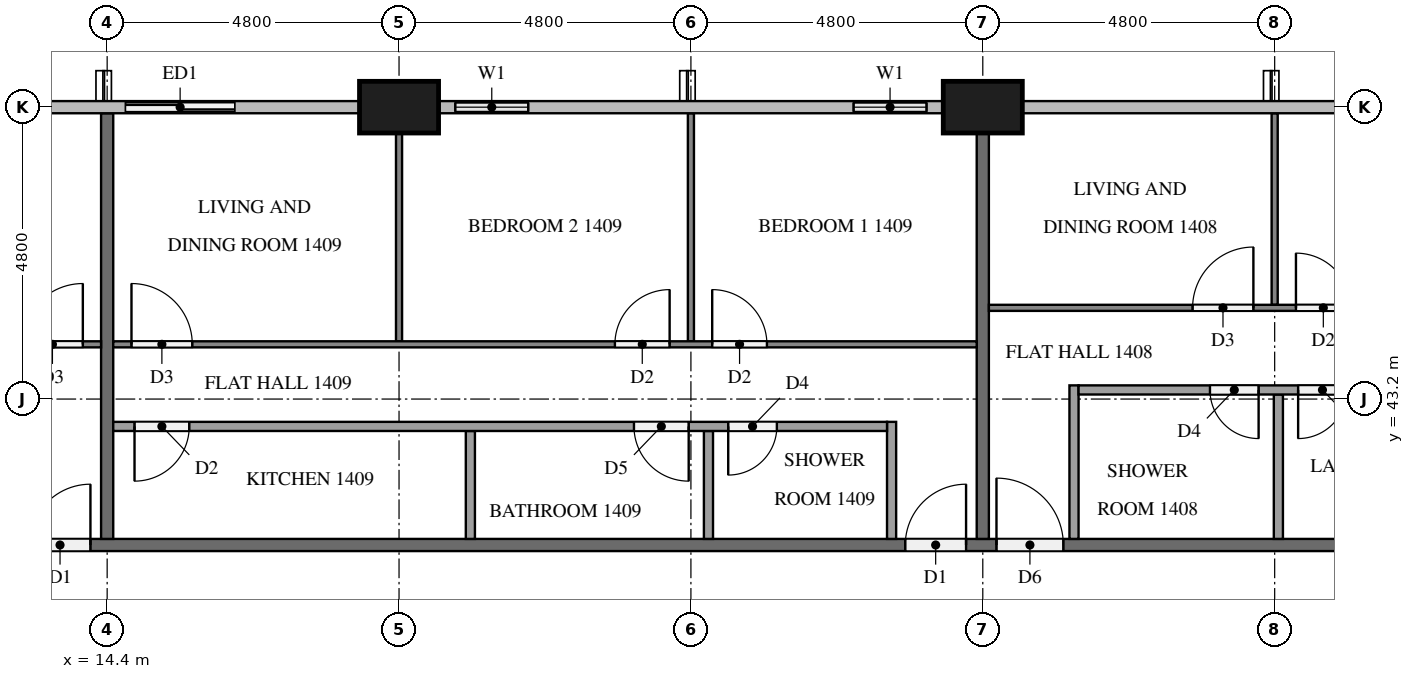
"""IFC4 building model, lengths in metres.
Left out: names, types, materials, properties, quantities, classifications, styles, units other than length and angle.
Written with IfcOpenShell. Run it as: python <this file> out.ifc"""

import sys

from ifc_helpers import new_model, si_unit, direction, frame, frame_2d, origin, origin_2d, place, context, subcontext, project, spatial, rectangle, extrude, element, fill, save


model = new_model("IFC4")
c1 = context("Model", 3, precision=1e-05, world=origin(), true_north=direction((0.0, 1.0)))
c2 = subcontext(c1, "Body", "Model", "MODEL_VIEW")
j1 = project(units=[si_unit("LENGTHUNIT", "METRE"), si_unit("PLANEANGLEUNIT", "RADIAN")], contexts=[c1])
p1 = place(None, origin())
s1 = spatial("IfcSite", under=j1, at=p1, CompositionType="ELEMENT")
p2 = place(p1, origin())
s2 = spatial("IfcBuilding", under=s1, at=p2, CompositionType="ELEMENT")
p3 = place(p2, frame((0.0, 0.0, 59.3)))
s3 = spatial("IfcBuildingStorey", under=s2, at=p3, CompositionType="ELEMENT", Elevation=59.3)
for number, where, z_axis, x_axis in (
    (1, (28.8, 48.0, 0.0), (0.0, 0.0, 1.0), (1.0, 0.0, 0.0)),
    (2, (19.2, 48.0, 0.0), (0.0, 0.0, 1.0), (1.0, 0.0, 0.0)),
):
    element("IfcColumn", number, at=place(p3, frame(where, z_axis=z_axis, x_axis=x_axis)), inside=s3, PredefinedType="COLUMN", context=c2, shape_type="SweptSolid", body=[
        extrude(rectangle(XDim=1.3, YDim=0.85, at=origin_2d()), origin(), (0.0, 0.0, 1.0), 3.2),
    ])
p4 = place(p3, frame((28.15, 48.0, 0.0), z_axis=(0.0, 0.0, 1.0), x_axis=(-1.0, 0.0, 0.0)))
e3 = element("IfcWall", 3, at=p4, inside=s3, PredefinedType="SOLIDWALL", context=c2, shape_type="SweptSolid", body=[
    extrude(rectangle(XDim=1.75, YDim=0.15, at=frame_2d((0.875, 0.0))), origin(), (0.0, 0.0, 1.0), 3.2),
])
p5 = place(p4, frame((0.275, 0.0, 0.9)))
e4 = element("IfcOpeningElement", 4, at=p5, cuts=e3, PredefinedType="OPENING", context=c2, shape_type="SweptSolid", body=[
    extrude(rectangle(XDim=1.2, YDim=1.4, at=frame_2d((0.6, 0.7))), frame((0.0, 0.085, 0.0), z_axis=(0.0, -1.0, 0.0), x_axis=(1.0, 0.0, 0.0)), (0.0, 0.0, 1.0), 0.17),
])
p6 = place(p3, frame((21.6, 48.0, 0.0), z_axis=(0.0, 0.0, 1.0), x_axis=(-1.0, 0.0, 0.0)))
e5 = element("IfcWall", 5, at=p6, inside=s3, PredefinedType="SOLIDWALL", context=c2, shape_type="SweptSolid", body=[
    extrude(rectangle(XDim=1.75, YDim=0.15, at=frame_2d((0.875, 0.0))), origin(), (0.0, 0.0, 1.0), 3.2),
])
p7 = place(p6, frame((0.275, 0.0, 0.9)))
e6 = element("IfcOpeningElement", 6, at=p7, cuts=e5, PredefinedType="OPENING", context=c2, shape_type="SweptSolid", body=[
    extrude(rectangle(XDim=1.2, YDim=1.4, at=frame_2d((0.6, 0.7))), frame((0.0, 0.085, 0.0), z_axis=(0.0, -1.0, 0.0), x_axis=(1.0, 0.0, 0.0)), (0.0, 0.0, 1.0), 0.17),
])
p8 = place(p3, frame((16.8, 48.0, 0.0), z_axis=(0.0, 0.0, 1.0), x_axis=(-1.0, 0.0, 0.0)))
e7 = element("IfcWall", 7, at=p8, inside=s3, PredefinedType="SOLIDWALL", context=c2, shape_type="SweptSolid", body=[
    extrude(rectangle(XDim=2.4, YDim=0.15, at=frame_2d((1.2, 0.0))), origin(), (0.0, 0.0, 1.0), 3.2),
])
p9 = place(p8, frame((0.3, 0.0, 0.0)))
e8 = element("IfcOpeningElement", 8, at=p9, cuts=e7, PredefinedType="OPENING", context=c2, shape_type="SweptSolid", body=[
    extrude(rectangle(XDim=1.8, YDim=2.4, at=frame_2d((0.9, 1.2))), frame((0.0, 0.085, 0.0), z_axis=(0.0, -1.0, 0.0), x_axis=(1.0, 0.0, 0.0)), (0.0, 0.0, 1.0), 0.17),
])
p10 = place(p3, frame((11.9, 40.8, 0.0), z_axis=(0.0, 0.0, 1.0), x_axis=(1.0, 0.0, 0.0)))
e9 = element("IfcWall", 9, at=p10, inside=s3, PredefinedType="PARTITIONING", context=c2, shape_type="SweptSolid", body=[
    extrude(rectangle(XDim=38.6, YDim=0.2, at=frame_2d((19.3, 0.0))), origin(), (0.0, 0.0, 1.0), 3.2),
])
p11 = place(p10, frame((36.375, 0.0, 0.0)))
e10 = element("IfcOpeningElement", 10, at=p11, cuts=e9, PredefinedType="OPENING", context=c2, shape_type="SweptSolid", body=[
    extrude(rectangle(XDim=1.0, YDim=2.1, at=frame_2d((0.5, 1.05))), frame((0.0, 0.11, 0.0), z_axis=(0.0, -1.0, 0.0), x_axis=(1.0, 0.0, 0.0)), (0.0, 0.0, 1.0), 0.22),
])
p12 = place(p10, frame((17.125, 0.0, 0.0)))
e11 = element("IfcOpeningElement", 11, at=p12, cuts=e9, PredefinedType="OPENING", context=c2, shape_type="SweptSolid", body=[
    extrude(rectangle(XDim=1.1, YDim=2.1, at=frame_2d((0.55, 1.05))), frame((0.0, 0.11, 0.0), z_axis=(0.0, -1.0, 0.0), x_axis=(1.0, 0.0, 0.0)), (0.0, 0.0, 1.0), 0.22),
])
p13 = place(p10, frame((15.625, 0.0, 0.0)))
e12 = element("IfcOpeningElement", 12, at=p13, cuts=e9, PredefinedType="OPENING", context=c2, shape_type="SweptSolid", body=[
    extrude(rectangle(XDim=1.0, YDim=2.1, at=frame_2d((0.5, 1.05))), frame((0.0, 0.11, 0.0), z_axis=(0.0, -1.0, 0.0), x_axis=(1.0, 0.0, 0.0)), (0.0, 0.0, 1.0), 0.22),
])
p14 = place(p10, frame((1.225, 0.0, 0.0)))
e13 = element("IfcOpeningElement", 13, at=p14, cuts=e9, PredefinedType="OPENING", context=c2, shape_type="SweptSolid", body=[
    extrude(rectangle(XDim=1.0, YDim=2.1, at=frame_2d((0.5, 1.05))), frame((0.0, 0.11, 0.0), z_axis=(0.0, -1.0, 0.0), x_axis=(1.0, 0.0, 0.0)), (0.0, 0.0, 1.0), 0.22),
])
p15 = place(p3, frame((28.8, 47.575, 0.0), z_axis=(0.0, 0.0, 1.0), x_axis=(0.0, -1.0, 0.0)))
e14 = element("IfcWall", 14, at=p15, inside=s3, PredefinedType="PARTITIONING", context=c2, shape_type="SweptSolid", body=[
    extrude(rectangle(XDim=6.675, YDim=0.2, at=frame_2d((3.337, 0.0))), origin(), (0.0, 0.0, 1.0), 3.2),
])
p16 = place(p3, frame((14.4, 47.9, 0.0), z_axis=(0.0, 0.0, 1.0), x_axis=(0.0, -1.0, 0.0)))
e15 = element("IfcWall", 15, at=p16, inside=s3, PredefinedType="PARTITIONING", context=c2, shape_type="SweptSolid", body=[
    extrude(rectangle(XDim=7.0, YDim=0.2, at=frame_2d((3.5, 0.0))), origin(), (0.0, 0.0, 1.0), 3.2),
])
p17 = place(p3, frame((33.6, 44.75, 0.0), z_axis=(0.0, 0.0, 1.0), x_axis=(0.0, 1.0, 0.0)))
e16 = element("IfcWall", 16, at=p17, inside=s3, PredefinedType="PARTITIONING", context=c2, shape_type="SweptSolid", body=[
    extrude(rectangle(XDim=3.15, YDim=0.1, at=frame_2d((1.575, 0.0))), origin(), (0.0, 0.0, 1.0), 3.2),
])
p18 = place(p3, frame((28.9, 44.7, 0.0), z_axis=(0.0, 0.0, 1.0), x_axis=(1.0, 0.0, 0.0)))
e17 = element("IfcWall", 17, at=p18, inside=s3, PredefinedType="PARTITIONING", context=c2, shape_type="SweptSolid", body=[
    extrude(rectangle(XDim=19.0, YDim=0.1, at=frame_2d((9.5, 0.0))), origin(), (0.0, 0.0, 1.0), 3.2),
])
p19 = place(p18, frame((3.35, 0.0, 0.0)))
e18 = element("IfcOpeningElement", 18, at=p19, cuts=e17, PredefinedType="OPENING", context=c2, shape_type="SweptSolid", body=[
    extrude(rectangle(XDim=1.0, YDim=2.1, at=frame_2d((0.5, 1.05))), frame((0.0, 0.06, 0.0), z_axis=(0.0, -1.0, 0.0), x_axis=(1.0, 0.0, 0.0)), (0.0, 0.0, 1.0), 0.12),
])
p20 = place(p18, frame((5.05, 0.0, 0.0)))
e19 = element("IfcOpeningElement", 19, at=p20, cuts=e17, PredefinedType="OPENING", context=c2, shape_type="SweptSolid", body=[
    extrude(rectangle(XDim=0.9, YDim=2.1, at=frame_2d((0.45, 1.05))), frame((0.0, 0.06, 0.0), z_axis=(0.0, -1.0, 0.0), x_axis=(1.0, 0.0, 0.0)), (0.0, 0.0, 1.0), 0.12),
])
p21 = place(p18, frame((13.05, 0.0, 0.0)))
e20 = element("IfcOpeningElement", 20, at=p21, cuts=e17, PredefinedType="OPENING", context=c2, shape_type="SweptSolid", body=[
    extrude(rectangle(XDim=0.9, YDim=2.1, at=frame_2d((0.45, 1.05))), frame((0.0, 0.06, 0.0), z_axis=(0.0, -1.0, 0.0), x_axis=(1.0, 0.0, 0.0)), (0.0, 0.0, 1.0), 0.12),
])
p22 = place(p18, frame((14.65, 0.0, 0.0)))
e21 = element("IfcOpeningElement", 21, at=p22, cuts=e17, PredefinedType="OPENING", context=c2, shape_type="SweptSolid", body=[
    extrude(rectangle(XDim=0.9, YDim=2.1, at=frame_2d((0.45, 1.05))), frame((0.0, 0.06, 0.0), z_axis=(0.0, -1.0, 0.0), x_axis=(1.0, 0.0, 0.0)), (0.0, 0.0, 1.0), 0.12),
])
p23 = place(p3, frame((33.661, 40.9, 0.0), z_axis=(0.0, 0.0, 1.0), x_axis=(0.0, 1.0, 0.0)))
e22 = element("IfcWall", 22, at=p23, inside=s3, PredefinedType="PARTITIONING", context=c2, shape_type="SweptSolid", body=[
    extrude(rectangle(XDim=2.375, YDim=0.15, at=frame_2d((1.188, 0.0))), origin(), (0.0, 0.0, 1.0), 3.2),
])
p24 = place(p3, frame((30.3, 40.9, 0.0), z_axis=(0.0, 0.0, 1.0), x_axis=(0.0, 1.0, 0.0)))
e23 = element("IfcWall", 23, at=p24, inside=s3, PredefinedType="PARTITIONING", context=c2, shape_type="SweptSolid", body=[
    extrude(rectangle(XDim=2.525, YDim=0.15, at=frame_2d((1.263, 0.0))), origin(), (0.0, 0.0, 1.0), 3.2),
])
p25 = place(p3, frame((47.9, 43.35, 0.0), z_axis=(0.0, 0.0, 1.0), x_axis=(-1.0, 0.0, 0.0)))
e24 = element("IfcWall", 24, at=p25, inside=s3, PredefinedType="PARTITIONING", context=c2, shape_type="SweptSolid", body=[
    extrude(rectangle(XDim=17.525, YDim=0.15, at=frame_2d((8.762, 0.0))), origin(), (0.0, 0.0, 1.0), 3.2),
])
p26 = place(p25, frame((14.564, 0.0, 0.0)))
e25 = element("IfcOpeningElement", 25, at=p26, cuts=e24, PredefinedType="OPENING", context=c2, shape_type="SweptSolid", body=[
    extrude(rectangle(XDim=0.8, YDim=2.1, at=frame_2d((0.4, 1.05))), frame((0.0, 0.085, 0.0), z_axis=(0.0, -1.0, 0.0), x_axis=(1.0, 0.0, 0.0)), (0.0, 0.0, 1.0), 0.17),
])
p27 = place(p25, frame((13.114, 0.0, 0.0)))
e26 = element("IfcOpeningElement", 26, at=p27, cuts=e24, PredefinedType="OPENING", context=c2, shape_type="SweptSolid", body=[
    extrude(rectangle(XDim=0.8, YDim=2.1, at=frame_2d((0.4, 1.05))), frame((0.0, 0.085, 0.0), z_axis=(0.0, -1.0, 0.0), x_axis=(1.0, 0.0, 0.0)), (0.0, 0.0, 1.0), 0.17),
])
p28 = place(p25, frame((4.706, 0.0, 0.0)))
e27 = element("IfcOpeningElement", 27, at=p28, cuts=e24, PredefinedType="OPENING", context=c2, shape_type="SweptSolid", body=[
    extrude(rectangle(XDim=0.9, YDim=2.1, at=frame_2d((0.45, 1.05))), frame((0.0, 0.085, 0.0), z_axis=(0.0, -1.0, 0.0), x_axis=(1.0, 0.0, 0.0)), (0.0, 0.0, 1.0), 0.17),
])
p29 = place(p25, frame((3.156, 0.0, 0.0)))
e28 = element("IfcOpeningElement", 28, at=p29, cuts=e24, PredefinedType="OPENING", context=c2, shape_type="SweptSolid", body=[
    extrude(rectangle(XDim=0.9, YDim=2.1, at=frame_2d((0.45, 1.05))), frame((0.0, 0.085, 0.0), z_axis=(0.0, -1.0, 0.0), x_axis=(1.0, 0.0, 0.0)), (0.0, 0.0, 1.0), 0.17),
])
p30 = place(p3, frame((24.0, 44.15, 0.0), z_axis=(0.0, 0.0, 1.0), x_axis=(0.0, 1.0, 0.0)))
e29 = element("IfcWall", 29, at=p30, inside=s3, PredefinedType="PARTITIONING", context=c2, shape_type="SweptSolid", body=[
    extrude(rectangle(XDim=3.75, YDim=0.1, at=frame_2d((1.875, 0.0))), origin(), (0.0, 0.0, 1.0), 3.2),
])
p31 = place(p3, frame((19.2, 44.15, 0.0), z_axis=(0.0, 0.0, 1.0), x_axis=(0.0, 1.0, 0.0)))
e30 = element("IfcWall", 30, at=p31, inside=s3, PredefinedType="PARTITIONING", context=c2, shape_type="SweptSolid", body=[
    extrude(rectangle(XDim=3.425, YDim=0.1, at=frame_2d((1.712, 0.0))), origin(), (0.0, 0.0, 1.0), 3.2),
])
p32 = place(p3, frame((14.5, 44.1, 0.0), z_axis=(0.0, 0.0, 1.0), x_axis=(1.0, 0.0, 0.0)))
e31 = element("IfcWall", 31, at=p32, inside=s3, PredefinedType="PARTITIONING", context=c2, shape_type="SweptSolid", body=[
    extrude(rectangle(XDim=14.2, YDim=0.1, at=frame_2d((7.1, 0.0))), origin(), (0.0, 0.0, 1.0), 3.2),
])
p33 = place(p32, frame((9.85, 0.0, 0.0)))
e32 = element("IfcOpeningElement", 32, at=p33, cuts=e31, PredefinedType="OPENING", context=c2, shape_type="SweptSolid", body=[
    extrude(rectangle(XDim=0.9, YDim=2.1, at=frame_2d((0.45, 1.05))), frame((0.0, 0.06, 0.0), z_axis=(0.0, -1.0, 0.0), x_axis=(1.0, 0.0, 0.0)), (0.0, 0.0, 1.0), 0.12),
])
p34 = place(p32, frame((8.25, 0.0, 0.0)))
e33 = element("IfcOpeningElement", 33, at=p34, cuts=e31, PredefinedType="OPENING", context=c2, shape_type="SweptSolid", body=[
    extrude(rectangle(XDim=0.9, YDim=2.1, at=frame_2d((0.45, 1.05))), frame((0.0, 0.06, 0.0), z_axis=(0.0, -1.0, 0.0), x_axis=(1.0, 0.0, 0.0)), (0.0, 0.0, 1.0), 0.12),
])
p35 = place(p32, frame((0.3, 0.0, 0.0)))
e34 = element("IfcOpeningElement", 34, at=p35, cuts=e31, PredefinedType="OPENING", context=c2, shape_type="SweptSolid", body=[
    extrude(rectangle(XDim=1.0, YDim=2.1, at=frame_2d((0.5, 1.05))), frame((0.0, 0.06, 0.0), z_axis=(0.0, -1.0, 0.0), x_axis=(1.0, 0.0, 0.0)), (0.0, 0.0, 1.0), 0.12),
])
for number, where, z_axis, x_axis in (
    (35, (24.289, 40.9, 0.0), (0.0, 0.0, 1.0), (0.0, 1.0, 0.0)),
    (36, (20.373, 40.9, 0.0), (0.0, 0.0, 1.0), (0.0, 1.0, 0.0)),
):
    element("IfcWall", number, at=place(p3, frame(where, z_axis=z_axis, x_axis=x_axis)), inside=s3, PredefinedType="PARTITIONING", context=c2, shape_type="SweptSolid", body=[
        extrude(rectangle(XDim=1.775, YDim=0.15, at=frame_2d((0.888, 0.0))), origin(), (0.0, 0.0, 1.0), 3.2),
    ])
p36 = place(p3, frame((27.3, 40.9, 0.0), z_axis=(0.0, 0.0, 1.0), x_axis=(0.0, 1.0, 0.0)))
e37 = element("IfcWall", 37, at=p36, inside=s3, PredefinedType="PARTITIONING", context=c2, shape_type="SweptSolid", body=[
    extrude(rectangle(XDim=1.925, YDim=0.15, at=frame_2d((0.962, 0.0))), origin(), (0.0, 0.0, 1.0), 3.2),
])
p37 = place(p3, frame((27.225, 42.75, 0.0), z_axis=(0.0, 0.0, 1.0), x_axis=(-1.0, 0.0, 0.0)))
e38 = element("IfcWall", 38, at=p37, inside=s3, PredefinedType="PARTITIONING", context=c2, shape_type="SweptSolid", body=[
    extrude(rectangle(XDim=12.725, YDim=0.15, at=frame_2d((6.363, 0.0))), origin(), (0.0, 0.0, 1.0), 3.2),
])
p38 = place(p37, frame((1.812, 0.0, 0.0)))
e39 = element("IfcOpeningElement", 39, at=p38, cuts=e38, PredefinedType="OPENING", context=c2, shape_type="SweptSolid", body=[
    extrude(rectangle(XDim=0.8, YDim=2.1, at=frame_2d((0.4, 1.05))), frame((0.0, 0.085, 0.0), z_axis=(0.0, -1.0, 0.0), x_axis=(1.0, 0.0, 0.0)), (0.0, 0.0, 1.0), 0.17),
])
p39 = place(p37, frame((3.261, 0.0, 0.0)))
e40 = element("IfcOpeningElement", 40, at=p39, cuts=e38, PredefinedType="OPENING", context=c2, shape_type="SweptSolid", body=[
    extrude(rectangle(XDim=0.9, YDim=2.1, at=frame_2d((0.45, 1.05))), frame((0.0, 0.085, 0.0), z_axis=(0.0, -1.0, 0.0), x_axis=(1.0, 0.0, 0.0)), (0.0, 0.0, 1.0), 0.17),
])
p40 = place(p37, frame((11.475, 0.0, 0.0)))
e41 = element("IfcOpeningElement", 41, at=p40, cuts=e38, PredefinedType="OPENING", context=c2, shape_type="SweptSolid", body=[
    extrude(rectangle(XDim=0.9, YDim=2.1, at=frame_2d((0.45, 1.05))), frame((0.0, 0.085, 0.0), z_axis=(0.0, -1.0, 0.0), x_axis=(1.0, 0.0, 0.0)), (0.0, 0.0, 1.0), 0.17),
])
p41 = place(p3, frame((5.141, 44.1, 0.0), z_axis=(0.0, 0.0, 1.0), x_axis=(1.0, 0.0, 0.0)))
e42 = element("IfcWall", 42, at=p41, inside=s3, PredefinedType="PARTITIONING", context=c2, shape_type="SweptSolid", body=[
    extrude(rectangle(XDim=9.159, YDim=0.1, at=frame_2d((4.58, 0.0))), origin(), (0.0, 0.0, 1.0), 3.2),
])
p42 = place(p41, frame((7.859, 0.0, 0.0)))
e43 = element("IfcOpeningElement", 43, at=p42, cuts=e42, PredefinedType="OPENING", context=c2, shape_type="SweptSolid", body=[
    extrude(rectangle(XDim=1.0, YDim=2.1, at=frame_2d((0.5, 1.05))), frame((0.0, 0.06, 0.0), z_axis=(0.0, -1.0, 0.0), x_axis=(1.0, 0.0, 0.0)), (0.0, 0.0, 1.0), 0.12),
])
p43 = place(p41, frame((0.3, 0.0, 0.0)))
e44 = element("IfcOpeningElement", 44, at=p43, cuts=e42, PredefinedType="OPENING", context=c2, shape_type="SweptSolid", body=[
    extrude(rectangle(XDim=0.9, YDim=2.1, at=frame_2d((0.45, 1.05))), frame((0.0, 0.06, 0.0), z_axis=(0.0, -1.0, 0.0), x_axis=(1.0, 0.0, 0.0)), (0.0, 0.0, 1.0), 0.12),
])
p44 = place(p5, origin())
e45 = element("IfcWindow", 45, at=p44, inside=s3, PartitioningType="SINGLE_PANEL", PredefinedType="WINDOW", context=c2, shape_type="SweptSolid", body=[
    extrude(rectangle(XDim=1.2, YDim=1.4, at=frame_2d((0.6, 0.7))), frame((0.0, 0.03, 0.0), z_axis=(0.0, -1.0, 0.0), x_axis=(1.0, 0.0, 0.0)), (0.0, 0.0, 1.0), 0.06),
])
fill(e4, e45)
p45 = place(p7, origin())
e46 = element("IfcWindow", 46, at=p45, inside=s3, PartitioningType="SINGLE_PANEL", PredefinedType="WINDOW", context=c2, shape_type="SweptSolid", body=[
    extrude(rectangle(XDim=1.2, YDim=1.4, at=frame_2d((0.6, 0.7))), frame((0.0, 0.03, 0.0), z_axis=(0.0, -1.0, 0.0), x_axis=(1.0, 0.0, 0.0)), (0.0, 0.0, 1.0), 0.06),
])
fill(e6, e46)
p46 = place(p9, origin())
e47 = element("IfcDoor", 47, at=p46, inside=s3, OperationType="SLIDING_TO_LEFT", PredefinedType="DOOR", context=c2, shape_type="SweptSolid", body=[
    extrude(rectangle(XDim=1.8, YDim=2.4, at=frame_2d((0.9, 1.2))), frame((0.0, 0.025, 0.0), z_axis=(0.0, -1.0, 0.0), x_axis=(1.0, 0.0, 0.0)), (0.0, 0.0, 1.0), 0.05),
])
fill(e8, e47)
p47 = place(p12, origin())
e48 = element("IfcDoor", 48, at=p47, inside=s3, OperationType="SINGLE_SWING_LEFT", PredefinedType="DOOR", context=c2, shape_type="SweptSolid", body=[
    extrude(rectangle(XDim=1.1, YDim=2.1, at=frame_2d((0.55, 1.05))), frame((0.0, 0.025, 0.0), z_axis=(0.0, -1.0, 0.0), x_axis=(1.0, 0.0, 0.0)), (0.0, 0.0, 1.0), 0.05),
])
fill(e11, e48)
p48 = place(p13, origin())
e49 = element("IfcDoor", 49, at=p48, inside=s3, OperationType="SINGLE_SWING_RIGHT", PredefinedType="DOOR", context=c2, shape_type="SweptSolid", body=[
    extrude(rectangle(XDim=1.0, YDim=2.1, at=frame_2d((0.5, 1.05))), frame((0.0, 0.025, 0.0), z_axis=(0.0, -1.0, 0.0), x_axis=(1.0, 0.0, 0.0)), (0.0, 0.0, 1.0), 0.05),
])
fill(e12, e49)
p49 = place(p14, origin())
e50 = element("IfcDoor", 50, at=p49, inside=s3, OperationType="SINGLE_SWING_RIGHT", PredefinedType="DOOR", context=c2, shape_type="SweptSolid", body=[
    extrude(rectangle(XDim=1.0, YDim=2.1, at=frame_2d((0.5, 1.05))), frame((0.0, 0.025, 0.0), z_axis=(0.0, -1.0, 0.0), x_axis=(1.0, 0.0, 0.0)), (0.0, 0.0, 1.0), 0.05),
])
fill(e13, e50)
p50 = place(p19, origin())
e51 = element("IfcDoor", 51, at=p50, inside=s3, OperationType="SINGLE_SWING_RIGHT", PredefinedType="DOOR", context=c2, shape_type="SweptSolid", body=[
    extrude(rectangle(XDim=1.0, YDim=2.1, at=frame_2d((0.5, 1.05))), frame((0.0, 0.025, 0.0), z_axis=(0.0, -1.0, 0.0), x_axis=(1.0, 0.0, 0.0)), (0.0, 0.0, 1.0), 0.05),
])
fill(e18, e51)
p51 = place(p20, origin())
e52 = element("IfcDoor", 52, at=p51, inside=s3, OperationType="SINGLE_SWING_LEFT", PredefinedType="DOOR", context=c2, shape_type="SweptSolid", body=[
    extrude(rectangle(XDim=0.9, YDim=2.1, at=frame_2d((0.45, 1.05))), frame((0.0, 0.025, 0.0), z_axis=(0.0, -1.0, 0.0), x_axis=(1.0, 0.0, 0.0)), (0.0, 0.0, 1.0), 0.05),
])
fill(e19, e52)
p52 = place(p26, origin())
e53 = element("IfcDoor", 53, at=p52, inside=s3, OperationType="SINGLE_SWING_LEFT", PredefinedType="DOOR", context=c2, shape_type="SweptSolid", body=[
    extrude(rectangle(XDim=0.8, YDim=2.1, at=frame_2d((0.4, 1.05))), frame((0.0, 0.025, 0.0), z_axis=(0.0, -1.0, 0.0), x_axis=(1.0, 0.0, 0.0)), (0.0, 0.0, 1.0), 0.05),
])
fill(e25, e53)
p53 = place(p27, origin())
e54 = element("IfcDoor", 54, at=p53, inside=s3, OperationType="SINGLE_SWING_RIGHT", PredefinedType="DOOR", context=c2, shape_type="SweptSolid", body=[
    extrude(rectangle(XDim=0.8, YDim=2.1, at=frame_2d((0.4, 1.05))), frame((0.0, 0.025, 0.0), z_axis=(0.0, -1.0, 0.0), x_axis=(1.0, 0.0, 0.0)), (0.0, 0.0, 1.0), 0.05),
])
fill(e26, e54)
p54 = place(p33, origin())
e55 = element("IfcDoor", 55, at=p54, inside=s3, OperationType="SINGLE_SWING_LEFT", PredefinedType="DOOR", context=c2, shape_type="SweptSolid", body=[
    extrude(rectangle(XDim=0.9, YDim=2.1, at=frame_2d((0.45, 1.05))), frame((0.0, 0.025, 0.0), z_axis=(0.0, -1.0, 0.0), x_axis=(1.0, 0.0, 0.0)), (0.0, 0.0, 1.0), 0.05),
])
fill(e32, e55)
p55 = place(p34, origin())
e56 = element("IfcDoor", 56, at=p55, inside=s3, OperationType="SINGLE_SWING_RIGHT", PredefinedType="DOOR", context=c2, shape_type="SweptSolid", body=[
    extrude(rectangle(XDim=0.9, YDim=2.1, at=frame_2d((0.45, 1.05))), frame((0.0, 0.025, 0.0), z_axis=(0.0, -1.0, 0.0), x_axis=(1.0, 0.0, 0.0)), (0.0, 0.0, 1.0), 0.05),
])
fill(e33, e56)
p56 = place(p35, origin())
e57 = element("IfcDoor", 57, at=p56, inside=s3, OperationType="SINGLE_SWING_LEFT", PredefinedType="DOOR", context=c2, shape_type="SweptSolid", body=[
    extrude(rectangle(XDim=1.0, YDim=2.1, at=frame_2d((0.5, 1.05))), frame((0.0, 0.025, 0.0), z_axis=(0.0, -1.0, 0.0), x_axis=(1.0, 0.0, 0.0)), (0.0, 0.0, 1.0), 0.05),
])
fill(e34, e57)
p57 = place(p38, origin())
e58 = element("IfcDoor", 58, at=p57, inside=s3, OperationType="SINGLE_SWING_RIGHT", PredefinedType="DOOR", context=c2, shape_type="SweptSolid", body=[
    extrude(rectangle(XDim=0.8, YDim=2.1, at=frame_2d((0.4, 1.05))), frame((0.0, 0.025, 0.0), z_axis=(0.0, -1.0, 0.0), x_axis=(1.0, 0.0, 0.0)), (0.0, 0.0, 1.0), 0.05),
])
fill(e39, e58)
p58 = place(p39, origin())
e59 = element("IfcDoor", 59, at=p58, inside=s3, OperationType="SINGLE_SWING_LEFT", PredefinedType="DOOR", context=c2, shape_type="SweptSolid", body=[
    extrude(rectangle(XDim=0.9, YDim=2.1, at=frame_2d((0.45, 1.05))), frame((0.0, 0.025, 0.0), z_axis=(0.0, -1.0, 0.0), x_axis=(1.0, 0.0, 0.0)), (0.0, 0.0, 1.0), 0.05),
])
fill(e40, e59)
p59 = place(p40, origin())
e60 = element("IfcDoor", 60, at=p59, inside=s3, OperationType="SINGLE_SWING_RIGHT", PredefinedType="DOOR", context=c2, shape_type="SweptSolid", body=[
    extrude(rectangle(XDim=0.9, YDim=2.1, at=frame_2d((0.45, 1.05))), frame((0.0, 0.025, 0.0), z_axis=(0.0, -1.0, 0.0), x_axis=(1.0, 0.0, 0.0)), (0.0, 0.0, 1.0), 0.05),
])
fill(e41, e60)
p60 = place(p42, origin())
e61 = element("IfcDoor", 61, at=p60, inside=s3, OperationType="SINGLE_SWING_RIGHT", PredefinedType="DOOR", context=c2, shape_type="SweptSolid", body=[
    extrude(rectangle(XDim=1.0, YDim=2.1, at=frame_2d((0.5, 1.05))), frame((0.0, 0.025, 0.0), z_axis=(0.0, -1.0, 0.0), x_axis=(1.0, 0.0, 0.0)), (0.0, 0.0, 1.0), 0.05),
])
fill(e43, e61)
save(model, sys.argv[1])
